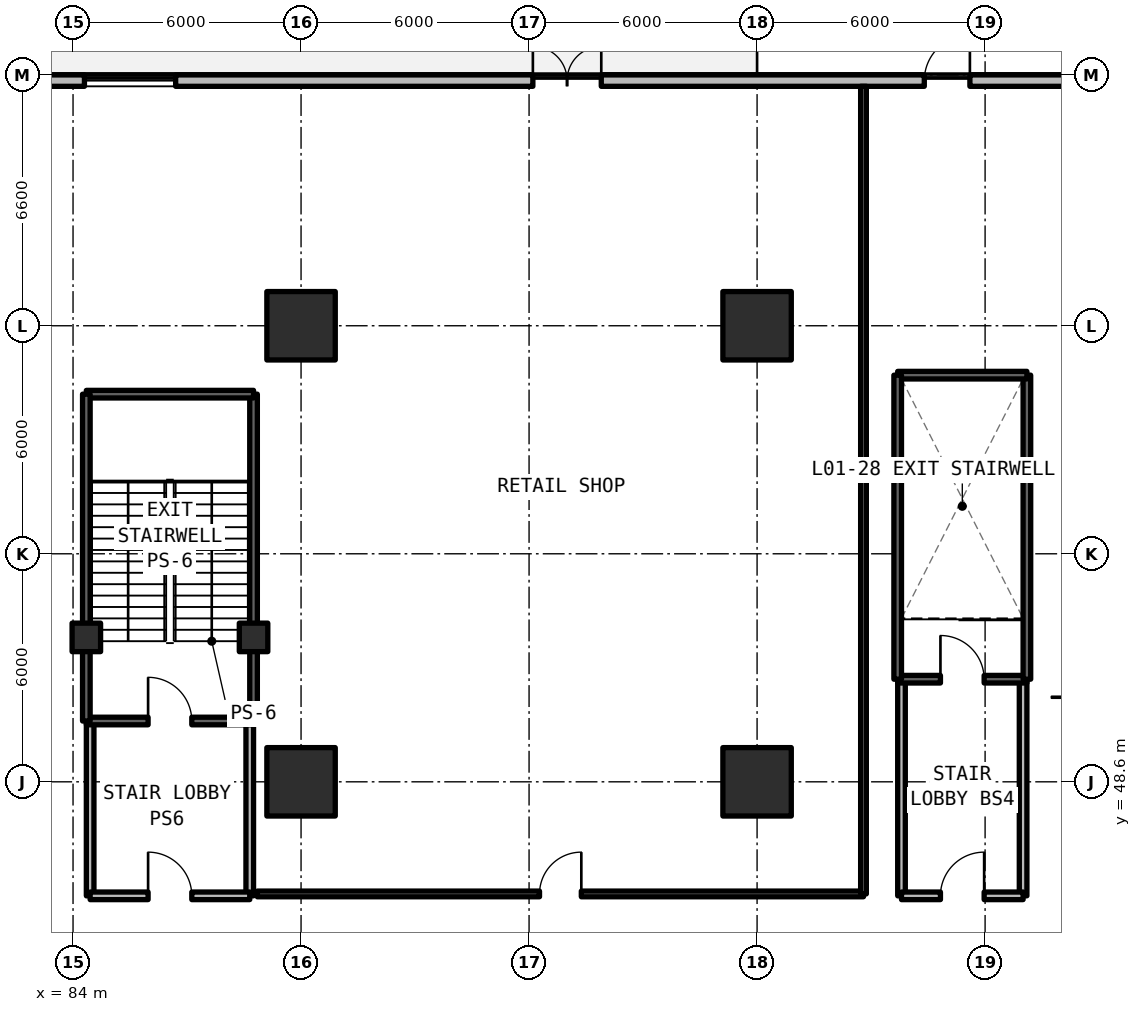
"""IFC4 building model, lengths in metres.
Left out: names, types, materials, properties, quantities, classifications, styles, units other than length and angle.
Written with IfcOpenShell. Run it as: python <this file> out.ifc"""

import sys

from ifc_helpers import new_model, si_unit, direction, frame, frame_2d, origin, origin_2d, place, context, subcontext, project, spatial, rectangle, extrude, element, fill, save


model = new_model("IFC4")
c1 = context("Model", 3, precision=1e-05, world=origin(), true_north=direction((0.0, 1.0)))
c2 = subcontext(c1, "Body", "Model", "MODEL_VIEW")
j1 = project(units=[si_unit("LENGTHUNIT", "METRE"), si_unit("PLANEANGLEUNIT", "RADIAN")], contexts=[c1])
p1 = place(None, origin())
s1 = spatial("IfcSite", under=j1, at=p1, CompositionType="ELEMENT")
p2 = place(p1, origin())
s2 = spatial("IfcBuilding", under=s1, at=p2, CompositionType="ELEMENT")
p3 = place(p2, origin())
s3 = spatial("IfcBuildingStorey", under=s2, at=p3, CompositionType="ELEMENT", Elevation=0.0)
for number, where, z_axis, x_axis in (
    (1, (90.0, 60.6, 0.0), (0.0, 0.0, 1.0), (1.0, 0.0, 0.0)),
    (2, (102.0, 60.6, 0.0), (0.0, 0.0, 1.0), (1.0, 0.0, 0.0)),
    (3, (90.0, 48.6, 0.0), (0.0, 0.0, 1.0), (1.0, 0.0, 0.0)),
    (4, (102.0, 48.6, 0.0), (0.0, 0.0, 1.0), (1.0, 0.0, 0.0)),
):
    element("IfcColumn", number, at=place(p3, frame(where, z_axis=z_axis, x_axis=x_axis)), inside=s3, PredefinedType="COLUMN", context=c2, shape_type="SweptSolid", body=[
        extrude(rectangle(XDim=1.8, YDim=1.8, at=origin_2d()), origin(), (0.0, 0.0, 1.0), 4.95),
    ])
for number, where, z_axis, x_axis in (
    (5, (84.35, 52.4, 0.0), (0.0, 0.0, 1.0), (1.0, 0.0, 0.0)),
    (6, (88.75, 52.4, 0.0), (0.0, 0.0, 1.0), (1.0, 0.0, 0.0)),
):
    element("IfcColumn", number, at=place(p3, frame(where, z_axis=z_axis, x_axis=x_axis)), inside=s3, PredefinedType="COLUMN", context=c2, shape_type="SweptSolid", body=[
        extrude(rectangle(XDim=0.75, YDim=0.75, at=origin_2d()), origin(), (0.0, 0.0, 1.0), 4.95),
    ])
p4 = place(p3, frame((113.85, 67.05, 0.0), z_axis=(0.0, 0.0, 1.0), x_axis=(-1.0, 0.0, 0.0)))
e7 = element("IfcWall", 7, at=p4, inside=s3, PredefinedType="SOLIDWALL", context=c2, shape_type="SweptSolid", body=[
    extrude(rectangle(XDim=113.7, YDim=0.3, at=frame_2d((56.85, 0.0))), origin(), (0.0, 0.0, 1.0), 4.67),
])
p5 = place(p4, frame((6.25, 0.0, 0.0)))
e8 = element("IfcOpeningElement", 8, at=p5, cuts=e7, PredefinedType="OPENING", context=c2, shape_type="SweptSolid", body=[
    extrude(rectangle(XDim=1.2, YDim=2.2, at=frame_2d((0.6, 1.1))), frame((0.0, 0.16, 0.0), z_axis=(0.0, -1.0, 0.0), x_axis=(1.0, 0.0, 0.0)), (0.0, 0.0, 1.0), 0.32),
])
p6 = place(p4, frame((15.95, 0.0, 0.0)))
e9 = element("IfcOpeningElement", 9, at=p6, cuts=e7, PredefinedType="OPENING", context=c2, shape_type="SweptSolid", body=[
    extrude(rectangle(XDim=1.8, YDim=2.25, at=frame_2d((0.9, 1.125))), frame((0.0, 0.16, 0.0), z_axis=(0.0, -1.0, 0.0), x_axis=(1.0, 0.0, 0.0)), (0.0, 0.0, 1.0), 0.32),
])
p7 = place(p4, frame((55.75, 0.0, 0.0)))
e10 = element("IfcOpeningElement", 10, at=p7, cuts=e7, PredefinedType="OPENING", context=c2, shape_type="SweptSolid", body=[
    extrude(rectangle(XDim=2.2, YDim=2.6, at=frame_2d((1.1, 1.3))), frame((0.0, 0.16, 0.0), z_axis=(0.0, -1.0, 0.0), x_axis=(1.0, 0.0, 0.0)), (0.0, 0.0, 1.0), 0.32),
])
p8 = place(p4, frame((70.05, 0.0, 0.0)))
e11 = element("IfcOpeningElement", 11, at=p8, cuts=e7, PredefinedType="OPENING", context=c2, shape_type="SweptSolid", body=[
    extrude(rectangle(XDim=1.8, YDim=2.25, at=frame_2d((0.9, 1.125))), frame((0.0, 0.16, 0.0), z_axis=(0.0, -1.0, 0.0), x_axis=(1.0, 0.0, 0.0)), (0.0, 0.0, 1.0), 0.32),
])
p9 = place(p4, frame((106.75, 0.0, 0.0)))
e12 = element("IfcOpeningElement", 12, at=p9, cuts=e7, PredefinedType="OPENING", context=c2, shape_type="SweptSolid", body=[
    extrude(rectangle(XDim=1.2, YDim=2.2, at=frame_2d((0.6, 1.1))), frame((0.0, 0.16, 0.0), z_axis=(0.0, -1.0, 0.0), x_axis=(1.0, 0.0, 0.0)), (0.0, 0.0, 1.0), 0.32),
])
p10 = place(p4, frame((67.5, 0.0, 0.78)))
e13 = element("IfcOpeningElement", 13, at=p10, cuts=e7, PredefinedType="OPENING", context=c2, shape_type="SweptSolid", body=[
    extrude(rectangle(XDim=1.4, YDim=1.65, at=frame_2d((0.7, 0.825))), frame((0.0, 0.16, 0.0), z_axis=(0.0, -1.0, 0.0), x_axis=(1.0, 0.0, 0.0)), (0.0, 0.0, 1.0), 0.32),
])
p11 = place(p4, frame((65.45, 0.0, 0.78)))
e14 = element("IfcOpeningElement", 14, at=p11, cuts=e7, PredefinedType="OPENING", context=c2, shape_type="SweptSolid", body=[
    extrude(rectangle(XDim=0.85, YDim=1.65, at=frame_2d((0.425, 0.825))), frame((0.0, 0.16, 0.0), z_axis=(0.0, -1.0, 0.0), x_axis=(1.0, 0.0, 0.0)), (0.0, 0.0, 1.0), 0.32),
])
p12 = place(p4, frame((27.15, 0.0, 0.78)))
e15 = element("IfcOpeningElement", 15, at=p12, cuts=e7, PredefinedType="OPENING", context=c2, shape_type="SweptSolid", body=[
    extrude(rectangle(XDim=2.4, YDim=1.66, at=frame_2d((1.2, 0.83))), frame((0.0, 0.16, 0.0), z_axis=(0.0, -1.0, 0.0), x_axis=(1.0, 0.0, 0.0)), (0.0, 0.0, 1.0), 0.32),
])
p13 = place(p4, frame((36.65, 0.0, 0.78)))
e16 = element("IfcOpeningElement", 16, at=p13, cuts=e7, PredefinedType="OPENING", context=c2, shape_type="SweptSolid", body=[
    extrude(rectangle(XDim=2.4, YDim=1.66, at=frame_2d((1.2, 0.83))), frame((0.0, 0.16, 0.0), z_axis=(0.0, -1.0, 0.0), x_axis=(1.0, 0.0, 0.0)), (0.0, 0.0, 1.0), 0.32),
])
p14 = place(p4, frame((74.65, 0.0, 0.78)))
e17 = element("IfcOpeningElement", 17, at=p14, cuts=e7, PredefinedType="OPENING", context=c2, shape_type="SweptSolid", body=[
    extrude(rectangle(XDim=2.4, YDim=1.66, at=frame_2d((1.2, 0.83))), frame((0.0, 0.16, 0.0), z_axis=(0.0, -1.0, 0.0), x_axis=(1.0, 0.0, 0.0)), (0.0, 0.0, 1.0), 0.32),
])
p15 = place(p4, frame((84.15, 0.0, 0.78)))
e18 = element("IfcOpeningElement", 18, at=p15, cuts=e7, PredefinedType="OPENING", context=c2, shape_type="SweptSolid", body=[
    extrude(rectangle(XDim=2.4, YDim=1.66, at=frame_2d((1.2, 0.83))), frame((0.0, 0.16, 0.0), z_axis=(0.0, -1.0, 0.0), x_axis=(1.0, 0.0, 0.0)), (0.0, 0.0, 1.0), 0.32),
])
p16 = place(p4, frame((93.65, 0.0, 0.78)))
e19 = element("IfcOpeningElement", 19, at=p16, cuts=e7, PredefinedType="OPENING", context=c2, shape_type="SweptSolid", body=[
    extrude(rectangle(XDim=2.4, YDim=1.66, at=frame_2d((1.2, 0.83))), frame((0.0, 0.16, 0.0), z_axis=(0.0, -1.0, 0.0), x_axis=(1.0, 0.0, 0.0)), (0.0, 0.0, 1.0), 0.32),
])
p17 = place(p4, frame((103.15, 0.0, 0.78)))
e20 = element("IfcOpeningElement", 20, at=p17, cuts=e7, PredefinedType="OPENING", context=c2, shape_type="SweptSolid", body=[
    extrude(rectangle(XDim=2.4, YDim=1.66, at=frame_2d((1.2, 0.83))), frame((0.0, 0.16, 0.0), z_axis=(0.0, -1.0, 0.0), x_axis=(1.0, 0.0, 0.0)), (0.0, 0.0, 1.0), 0.32),
])
for number, where, z_axis, x_axis in (
    (21, (84.45, 45.6, 0.0), (0.0, 0.0, 1.0), (0.0, 1.0, 0.0)),
    (22, (88.65, 45.6, 0.0), (0.0, 0.0, 1.0), (0.0, 1.0, 0.0)),
):
    element("IfcWall", number, at=place(p3, frame(where, z_axis=z_axis, x_axis=x_axis)), inside=s3, PredefinedType="SOLIDWALL", context=c2, shape_type="SweptSolid", body=[
        extrude(rectangle(XDim=4.6, YDim=0.2, at=frame_2d((2.3, 0.0))), origin(), (0.0, 0.0, 1.0), 3.89),
    ])
p18 = place(p3, frame((84.45, 45.6, 0.0), z_axis=(0.0, 0.0, 1.0), x_axis=(1.0, 0.0, 0.0)))
e23 = element("IfcWall", 23, at=p18, inside=s3, PredefinedType="SOLIDWALL", context=c2, shape_type="SweptSolid", body=[
    extrude(rectangle(XDim=4.2, YDim=0.2, at=frame_2d((2.1, 0.0))), origin(), (0.0, 0.0, 1.0), 3.89),
])
p19 = place(p18, frame((1.525, 0.0, 0.0)))
e24 = element("IfcOpeningElement", 24, at=p19, cuts=e23, PredefinedType="OPENING", context=c2, shape_type="SweptSolid", body=[
    extrude(rectangle(XDim=1.15, YDim=2.15, at=frame_2d((0.575, 1.075))), frame((0.0, 0.11, 0.0), z_axis=(0.0, -1.0, 0.0), x_axis=(1.0, 0.0, 0.0)), (0.0, 0.0, 1.0), 0.22),
])
for number, where, z_axis, x_axis in (
    (25, (105.8, 45.6, 0.0), (0.0, 0.0, 1.0), (0.0, 1.0, 0.0)),
    (26, (109.0, 45.6, 0.0), (0.0, 0.0, 1.0), (0.0, 1.0, 0.0)),
):
    element("IfcWall", number, at=place(p3, frame(where, z_axis=z_axis, x_axis=x_axis)), inside=s3, PredefinedType="SOLIDWALL", context=c2, shape_type="SweptSolid", body=[
        extrude(rectangle(XDim=5.7, YDim=0.2, at=frame_2d((2.85, 0.0))), origin(), (0.0, 0.0, 1.0), 3.89),
    ])
p20 = place(p3, frame((105.8, 45.6, 0.0), z_axis=(0.0, 0.0, 1.0), x_axis=(1.0, 0.0, 0.0)))
e27 = element("IfcWall", 27, at=p20, inside=s3, PredefinedType="SOLIDWALL", context=c2, shape_type="SweptSolid", body=[
    extrude(rectangle(XDim=3.2, YDim=0.2, at=frame_2d((1.6, 0.0))), origin(), (0.0, 0.0, 1.0), 3.89),
])
p21 = place(p20, frame((1.025, 0.0, 0.0)))
e28 = element("IfcOpeningElement", 28, at=p21, cuts=e27, PredefinedType="OPENING", context=c2, shape_type="SweptSolid", body=[
    extrude(rectangle(XDim=1.15, YDim=2.15, at=frame_2d((0.575, 1.075))), frame((0.0, 0.11, 0.0), z_axis=(0.0, -1.0, 0.0), x_axis=(1.0, 0.0, 0.0)), (0.0, 0.0, 1.0), 0.22),
])
p22 = place(p3, frame((88.85, 45.65, 0.0), z_axis=(0.0, 0.0, 1.0), x_axis=(1.0, 0.0, 0.0)))
e29 = element("IfcWall", 29, at=p22, inside=s3, PredefinedType="SOLIDWALL", context=c2, shape_type="SweptSolid", body=[
    extrude(rectangle(XDim=15.95, YDim=0.15, at=frame_2d((7.975, 0.0))), origin(), (0.0, 0.0, 1.0), 3.89),
])
p23 = place(p22, frame((7.425, 0.0, 0.0)))
e30 = element("IfcOpeningElement", 30, at=p23, cuts=e29, PredefinedType="OPENING", context=c2, shape_type="SweptSolid", body=[
    extrude(rectangle(XDim=1.1, YDim=2.15, at=frame_2d((0.55, 1.075))), frame((0.0, 0.085, 0.0), z_axis=(0.0, -1.0, 0.0), x_axis=(1.0, 0.0, 0.0)), (0.0, 0.0, 1.0), 0.17),
])
p24 = place(p3, frame((104.8, 45.65, 0.0), z_axis=(0.0, 0.0, 1.0), x_axis=(0.0, 1.0, 0.0)))
e31 = element("IfcWall", 31, at=p24, inside=s3, PredefinedType="SOLIDWALL", context=c2, shape_type="SweptSolid", body=[
    extrude(rectangle(XDim=21.25, YDim=0.15, at=frame_2d((10.625, 0.0))), origin(), (0.0, 0.0, 1.0), 3.89),
])
p25 = place(p3, frame((84.35, 50.2, 0.0), z_axis=(0.0, 0.0, 1.0), x_axis=(1.0, 0.0, 0.0)))
e32 = element("IfcWall", 32, at=p25, inside=s3, PredefinedType="SOLIDWALL", context=c2, shape_type="SweptSolid", body=[
    extrude(rectangle(XDim=4.4, YDim=0.2, at=frame_2d((2.2, 0.0))), origin(), (0.0, 0.0, 1.0), 4.95),
])
p26 = place(p25, frame((1.625, 0.0, 0.0)))
e33 = element("IfcOpeningElement", 33, at=p26, cuts=e32, PredefinedType="OPENING", context=c2, shape_type="SweptSolid", body=[
    extrude(rectangle(XDim=1.15, YDim=2.15, at=frame_2d((0.575, 1.075))), frame((0.0, 0.11, 0.0), z_axis=(0.0, -1.0, 0.0), x_axis=(1.0, 0.0, 0.0)), (0.0, 0.0, 1.0), 0.22),
])
p27 = place(p3, frame((88.75, 50.2, 0.0), z_axis=(0.0, 0.0, 1.0), x_axis=(0.0, 1.0, 0.0)))
e34 = element("IfcWall", 34, at=p27, inside=s3, PredefinedType="SOLIDWALL", context=c2, shape_type="SweptSolid", body=[
    extrude(rectangle(XDim=8.6, YDim=0.2, at=frame_2d((4.3, 0.0))), origin(), (0.0, 0.0, 1.0), 4.95),
])
p28 = place(p3, frame((88.75, 58.8, 0.0), z_axis=(0.0, 0.0, 1.0), x_axis=(-1.0, 0.0, 0.0)))
e35 = element("IfcWall", 35, at=p28, inside=s3, PredefinedType="SOLIDWALL", context=c2, shape_type="SweptSolid", body=[
    extrude(rectangle(XDim=4.4, YDim=0.2, at=frame_2d((2.2, 0.0))), origin(), (0.0, 0.0, 1.0), 4.95),
])
p29 = place(p3, frame((84.35, 58.8, 0.0), z_axis=(0.0, 0.0, 1.0), x_axis=(0.0, -1.0, 0.0)))
e36 = element("IfcWall", 36, at=p29, inside=s3, PredefinedType="SOLIDWALL", context=c2, shape_type="SweptSolid", body=[
    extrude(rectangle(XDim=8.6, YDim=0.2, at=frame_2d((4.3, 0.0))), origin(), (0.0, 0.0, 1.0), 4.95),
])
p30 = place(p3, frame((105.7, 51.3, 0.0), z_axis=(0.0, 0.0, 1.0), x_axis=(1.0, 0.0, 0.0)))
e37 = element("IfcWall", 37, at=p30, inside=s3, PredefinedType="SOLIDWALL", context=c2, shape_type="SweptSolid", body=[
    extrude(rectangle(XDim=3.4, YDim=0.2, at=frame_2d((1.7, 0.0))), origin(), (0.0, 0.0, 1.0), 4.95),
])
p31 = place(p30, frame((1.125, 0.0, 0.0)))
e38 = element("IfcOpeningElement", 38, at=p31, cuts=e37, PredefinedType="OPENING", context=c2, shape_type="SweptSolid", body=[
    extrude(rectangle(XDim=1.15, YDim=2.15, at=frame_2d((0.575, 1.075))), frame((0.0, 0.11, 0.0), z_axis=(0.0, -1.0, 0.0), x_axis=(1.0, 0.0, 0.0)), (0.0, 0.0, 1.0), 0.22),
])
p32 = place(p3, frame((109.1, 51.3, 0.0), z_axis=(0.0, 0.0, 1.0), x_axis=(0.0, 1.0, 0.0)))
e39 = element("IfcWall", 39, at=p32, inside=s3, PredefinedType="SOLIDWALL", context=c2, shape_type="SweptSolid", body=[
    extrude(rectangle(XDim=8.0, YDim=0.2, at=frame_2d((4.0, 0.0))), origin(), (0.0, 0.0, 1.0), 4.95),
])
p33 = place(p3, frame((109.1, 59.3, 0.0), z_axis=(0.0, 0.0, 1.0), x_axis=(-1.0, 0.0, 0.0)))
e40 = element("IfcWall", 40, at=p33, inside=s3, PredefinedType="SOLIDWALL", context=c2, shape_type="SweptSolid", body=[
    extrude(rectangle(XDim=3.4, YDim=0.2, at=frame_2d((1.7, 0.0))), origin(), (0.0, 0.0, 1.0), 4.95),
])
p34 = place(p3, frame((105.7, 59.3, 0.0), z_axis=(0.0, 0.0, 1.0), x_axis=(0.0, -1.0, 0.0)))
e41 = element("IfcWall", 41, at=p34, inside=s3, PredefinedType="SOLIDWALL", context=c2, shape_type="SweptSolid", body=[
    extrude(rectangle(XDim=8.0, YDim=0.2, at=frame_2d((4.0, 0.0))), origin(), (0.0, 0.0, 1.0), 4.95),
])
p35 = place(p5, frame((1.2, 0.0, 0.0), z_axis=(0.0, 0.0, 1.0), x_axis=(-1.0, 0.0, 0.0)))
e42 = element("IfcDoor", 42, at=p35, inside=s3, OperationType="SINGLE_SWING_LEFT", PredefinedType="DOOR", context=c2, shape_type="SweptSolid", body=[
    extrude(rectangle(XDim=1.2, YDim=2.2, at=frame_2d((0.6, 1.1))), frame((0.0, 0.025, 0.0), z_axis=(0.0, -1.0, 0.0), x_axis=(1.0, 0.0, 0.0)), (0.0, 0.0, 1.0), 0.05),
])
fill(e8, e42)
p36 = place(p6, frame((1.8, 0.0, 0.0), z_axis=(0.0, 0.0, 1.0), x_axis=(-1.0, 0.0, 0.0)))
e43 = element("IfcDoor", 43, at=p36, inside=s3, OperationType="SINGLE_SWING_RIGHT", PredefinedType="DOOR", context=c2, shape_type="SweptSolid", body=[
    extrude(rectangle(XDim=1.8, YDim=2.25, at=frame_2d((0.9, 1.125))), frame((0.0, 0.025, 0.0), z_axis=(0.0, -1.0, 0.0), x_axis=(1.0, 0.0, 0.0)), (0.0, 0.0, 1.0), 0.05),
])
fill(e9, e43)
p37 = place(p12, origin())
e44 = element("IfcWindow", 44, at=p37, inside=s3, PartitioningType="SINGLE_PANEL", PredefinedType="WINDOW", context=c2, shape_type="SweptSolid", body=[
    extrude(rectangle(XDim=2.4, YDim=1.66, at=frame_2d((1.2, 0.83))), frame((0.0, 0.03, 0.0), z_axis=(0.0, -1.0, 0.0), x_axis=(1.0, 0.0, 0.0)), (0.0, 0.0, 1.0), 0.06),
])
fill(e15, e44)
p38 = place(p19, frame((1.15, 0.0, 0.0), z_axis=(0.0, 0.0, 1.0), x_axis=(-1.0, 0.0, 0.0)))
e45 = element("IfcDoor", 45, at=p38, inside=s3, OperationType="SINGLE_SWING_LEFT", PredefinedType="DOOR", context=c2, shape_type="SweptSolid", body=[
    extrude(rectangle(XDim=1.15, YDim=2.15, at=frame_2d((0.575, 1.075))), frame((0.0, 0.025, 0.0), z_axis=(0.0, -1.0, 0.0), x_axis=(1.0, 0.0, 0.0)), (0.0, 0.0, 1.0), 0.05),
])
fill(e24, e45)
p39 = place(p21, frame((1.15, 0.0, 0.0), z_axis=(0.0, 0.0, 1.0), x_axis=(-1.0, 0.0, 0.0)))
e46 = element("IfcDoor", 46, at=p39, inside=s3, OperationType="SINGLE_SWING_RIGHT", PredefinedType="DOOR", context=c2, shape_type="SweptSolid", body=[
    extrude(rectangle(XDim=1.15, YDim=2.15, at=frame_2d((0.575, 1.075))), frame((0.0, 0.025, 0.0), z_axis=(0.0, -1.0, 0.0), x_axis=(1.0, 0.0, 0.0)), (0.0, 0.0, 1.0), 0.05),
])
fill(e28, e46)
p40 = place(p23, origin())
e47 = element("IfcDoor", 47, at=p40, inside=s3, OperationType="SINGLE_SWING_RIGHT", PredefinedType="DOOR", context=c2, shape_type="SweptSolid", body=[
    extrude(rectangle(XDim=1.1, YDim=2.15, at=frame_2d((0.55, 1.075))), frame((0.0, 0.025, 0.0), z_axis=(0.0, -1.0, 0.0), x_axis=(1.0, 0.0, 0.0)), (0.0, 0.0, 1.0), 0.05),
])
fill(e30, e47)
p41 = place(p26, frame((1.15, 0.0, 0.0), z_axis=(0.0, 0.0, 1.0), x_axis=(-1.0, 0.0, 0.0)))
e48 = element("IfcDoor", 48, at=p41, inside=s3, OperationType="SINGLE_SWING_RIGHT", PredefinedType="DOOR", context=c2, shape_type="SweptSolid", body=[
    extrude(rectangle(XDim=1.15, YDim=2.15, at=frame_2d((0.575, 1.075))), frame((0.0, 0.025, 0.0), z_axis=(0.0, -1.0, 0.0), x_axis=(1.0, 0.0, 0.0)), (0.0, 0.0, 1.0), 0.05),
])
fill(e33, e48)
p42 = place(p31, frame((1.15, 0.0, 0.0), z_axis=(0.0, 0.0, 1.0), x_axis=(-1.0, 0.0, 0.0)))
e49 = element("IfcDoor", 49, at=p42, inside=s3, OperationType="SINGLE_SWING_RIGHT", PredefinedType="DOOR", context=c2, shape_type="SweptSolid", body=[
    extrude(rectangle(XDim=1.15, YDim=2.15, at=frame_2d((0.575, 1.075))), frame((0.0, 0.025, 0.0), z_axis=(0.0, -1.0, 0.0), x_axis=(1.0, 0.0, 0.0)), (0.0, 0.0, 1.0), 0.05),
])
fill(e38, e49)
save(model, sys.argv[1])
